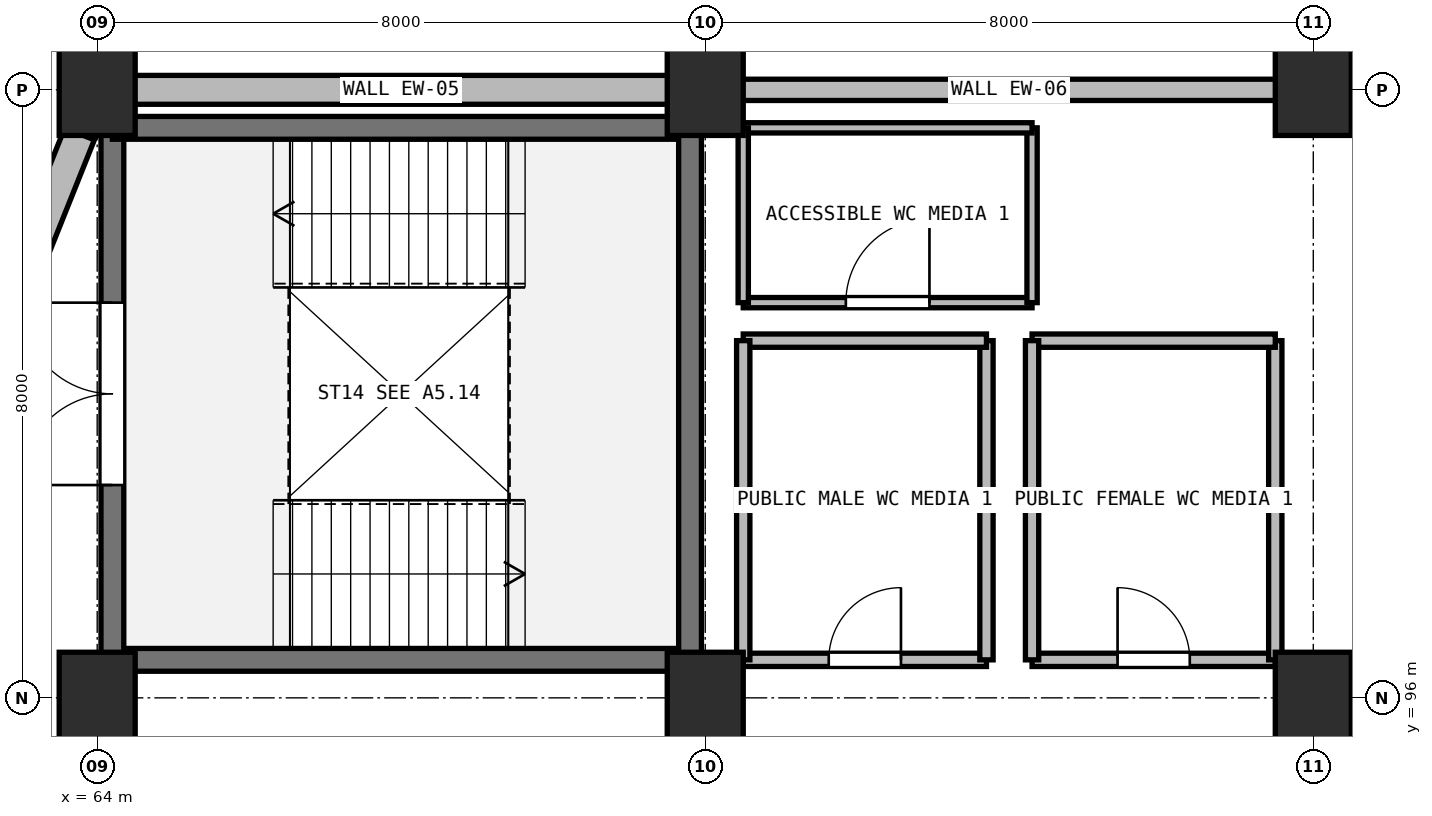
"""IFC4 building model, lengths in metres.
Left out: names, types, materials, properties, quantities, classifications, styles, units other than length and angle.
Written with IfcOpenShell. Run it as: python <this file> out.ifc"""

import sys

from ifc_helpers import new_model, si_unit, direction, frame, frame_2d, origin, origin_2d, place, context, subcontext, project, spatial, rectangle, extrude, element, fill, save


model = new_model("IFC4")
c1 = context("Model", 3, precision=1e-05, world=origin(), true_north=direction((0.0, 1.0)))
c2 = subcontext(c1, "Body", "Model", "MODEL_VIEW")
j1 = project(units=[si_unit("LENGTHUNIT", "METRE"), si_unit("PLANEANGLEUNIT", "RADIAN")], contexts=[c1])
p1 = place(None, origin())
s1 = spatial("IfcSite", under=j1, at=p1, CompositionType="ELEMENT")
p2 = place(p1, origin())
s2 = spatial("IfcBuilding", under=s1, at=p2, CompositionType="ELEMENT")
p3 = place(p2, frame((0.0, 0.0, 19.8)))
s3 = spatial("IfcBuildingStorey", under=s2, at=p3, CompositionType="ELEMENT", Elevation=19.8)
for number, where, z_axis, x_axis in (
    (1, (64.0, 96.0, 0.0), (0.0, 0.0, 1.0), (1.0, 0.0, 0.0)),
    (2, (64.0, 104.0, 0.0), (0.0, 0.0, 1.0), (1.0, 0.0, 0.0)),
    (3, (72.0, 96.0, 0.0), (0.0, 0.0, 1.0), (1.0, 0.0, 0.0)),
    (4, (72.0, 104.0, 0.0), (0.0, 0.0, 1.0), (1.0, 0.0, 0.0)),
    (5, (80.0, 96.0, 0.0), (0.0, 0.0, 1.0), (1.0, 0.0, 0.0)),
    (6, (80.0, 104.0, 0.0), (0.0, 0.0, 1.0), (1.0, 0.0, 0.0)),
):
    element("IfcColumn", number, at=place(p3, frame(where, z_axis=z_axis, x_axis=x_axis)), inside=s3, PredefinedType="COLUMN", context=c2, shape_type="SweptSolid", body=[
        extrude(rectangle(XDim=1.0, YDim=1.2, at=origin_2d()), origin(), (0.0, 0.0, 1.0), 4.8),
    ])
p4 = place(p3, frame((64.48, 104.0, 0.0), z_axis=(0.0, 0.0, 1.0), x_axis=(1.0, 0.0, 0.0)))
e7 = element("IfcWall", 7, at=p4, inside=s3, PredefinedType="SOLIDWALL", context=c2, shape_type="SweptSolid", body=[
    extrude(rectangle(XDim=7.04, YDim=0.38, at=frame_2d((3.52, 0.0))), origin(), (0.0, 0.0, 1.0), 3.6),
])
p5 = place(p3, frame((72.48, 104.0, 0.0), z_axis=(0.0, 0.0, 1.0), x_axis=(1.0, 0.0, 0.0)))
e8 = element("IfcWall", 8, at=p5, inside=s3, PredefinedType="SOLIDWALL", context=c2, shape_type="SweptSolid", body=[
    extrude(rectangle(XDim=7.04, YDim=0.28, at=frame_2d((3.52, 0.0))), origin(), (0.0, 0.0, 1.0), 3.6),
])
p6 = place(p3, frame((80.48, 104.0, 0.0), z_axis=(0.0, 0.0, 1.0), x_axis=(1.0, 0.0, 0.0)))
e9 = element("IfcWall", 9, at=p6, inside=s3, PredefinedType="SOLIDWALL", context=c2, shape_type="SweptSolid", body=[
    extrude(rectangle(XDim=7.04, YDim=0.29, at=frame_2d((3.52, 0.0))), origin(), (0.0, 0.0, 1.0), 3.6),
])
p7 = place(p3, frame((60.8, 96.0, 0.0), z_axis=(0.0, 0.0, 1.0), x_axis=(0.371395943584, 0.928474583976, 0.0)))
e10 = element("IfcWall", 10, at=p7, inside=s3, PredefinedType="SOLIDWALL", context=c2, shape_type="SweptSolid", body=[
    extrude(rectangle(XDim=7.991, YDim=0.42, at=frame_2d((3.996, 0.0))), origin(), (0.0, 0.0, 1.0), 3.45),
])
p8 = place(p3, frame((71.8, 96.5, 0.0), z_axis=(0.0, 0.0, 1.0), x_axis=(-1.0, 0.0, 0.0)))
e11 = element("IfcWall", 11, at=p8, inside=s3, PredefinedType="SHEAR", context=c2, shape_type="SweptSolid", body=[
    extrude(rectangle(XDim=7.6, YDim=0.3, at=frame_2d((3.8, 0.0))), origin(), (0.0, 0.0, 1.0), 4.5),
])
p9 = place(p3, frame((64.2, 96.5, 0.0), z_axis=(0.0, 0.0, 1.0), x_axis=(0.0, 1.0, 0.0)))
e12 = element("IfcWall", 12, at=p9, inside=s3, PredefinedType="SHEAR", context=c2, shape_type="SweptSolid", body=[
    extrude(rectangle(XDim=7.0, YDim=0.3, at=frame_2d((3.5, 0.0))), origin(), (0.0, 0.0, 1.0), 4.5),
])
p10 = place(p9, frame((2.3, 0.0, 0.0)))
e13 = element("IfcOpeningElement", 13, at=p10, cuts=e12, PredefinedType="OPENING", context=c2, shape_type="SweptSolid", body=[
    extrude(rectangle(XDim=2.4, YDim=2.2, at=frame_2d((1.2, 1.1))), frame((0.0, 0.16, 0.0), z_axis=(0.0, -1.0, 0.0), x_axis=(1.0, 0.0, 0.0)), (0.0, 0.0, 1.0), 0.32),
])
p11 = place(p3, frame((64.2, 103.5, 0.0), z_axis=(0.0, 0.0, 1.0), x_axis=(1.0, 0.0, 0.0)))
e14 = element("IfcWall", 14, at=p11, inside=s3, PredefinedType="SHEAR", context=c2, shape_type="SweptSolid", body=[
    extrude(rectangle(XDim=7.6, YDim=0.3, at=frame_2d((3.8, 0.0))), origin(), (0.0, 0.0, 1.0), 4.5),
])
p12 = place(p3, frame((71.8, 103.5, 0.0), z_axis=(0.0, 0.0, 1.0), x_axis=(0.0, -1.0, 0.0)))
e15 = element("IfcWall", 15, at=p12, inside=s3, PredefinedType="SHEAR", context=c2, shape_type="SweptSolid", body=[
    extrude(rectangle(XDim=7.0, YDim=0.3, at=frame_2d((3.5, 0.0))), origin(), (0.0, 0.0, 1.0), 4.5),
])
p13 = place(p3, frame((72.5, 96.5, 0.0), z_axis=(0.0, 0.0, 1.0), x_axis=(1.0, 0.0, 0.0)))
e16 = element("IfcWall", 16, at=p13, inside=s3, PredefinedType="PARTITIONING", context=c2, shape_type="SweptSolid", body=[
    extrude(rectangle(XDim=3.2, YDim=0.175, at=frame_2d((1.6, 0.0))), origin(), (0.0, 0.0, 1.0), 3.6),
])
p14 = place(p13, frame((1.125, 0.0, 0.0)))
e17 = element("IfcOpeningElement", 17, at=p14, cuts=e16, PredefinedType="OPENING", context=c2, shape_type="SweptSolid", body=[
    extrude(rectangle(XDim=0.95, YDim=2.15, at=frame_2d((0.475, 1.075))), frame((0.0, 0.098, 0.0), z_axis=(0.0, -1.0, 0.0), x_axis=(1.0, 0.0, 0.0)), (0.0, 0.0, 1.0), 0.195),
])
p15 = place(p3, frame((75.7, 96.5, 0.0), z_axis=(0.0, 0.0, 1.0), x_axis=(0.0, 1.0, 0.0)))
e18 = element("IfcWall", 18, at=p15, inside=s3, PredefinedType="PARTITIONING", context=c2, shape_type="SweptSolid", body=[
    extrude(rectangle(XDim=4.2, YDim=0.175, at=frame_2d((2.1, 0.0))), origin(), (0.0, 0.0, 1.0), 4.5),
])
p16 = place(p3, frame((75.7, 100.7, 0.0), z_axis=(0.0, 0.0, 1.0), x_axis=(-1.0, 0.0, 0.0)))
e19 = element("IfcWall", 19, at=p16, inside=s3, PredefinedType="PARTITIONING", context=c2, shape_type="SweptSolid", body=[
    extrude(rectangle(XDim=3.2, YDim=0.175, at=frame_2d((1.6, 0.0))), origin(), (0.0, 0.0, 1.0), 4.5),
])
p17 = place(p3, frame((72.5, 100.7, 0.0), z_axis=(0.0, 0.0, 1.0), x_axis=(0.0, -1.0, 0.0)))
e20 = element("IfcWall", 20, at=p17, inside=s3, PredefinedType="PARTITIONING", context=c2, shape_type="SweptSolid", body=[
    extrude(rectangle(XDim=4.2, YDim=0.175, at=frame_2d((2.1, 0.0))), origin(), (0.0, 0.0, 1.0), 3.6),
])
p18 = place(p3, frame((76.3, 96.5, 0.0), z_axis=(0.0, 0.0, 1.0), x_axis=(1.0, 0.0, 0.0)))
e21 = element("IfcWall", 21, at=p18, inside=s3, PredefinedType="PARTITIONING", context=c2, shape_type="SweptSolid", body=[
    extrude(rectangle(XDim=3.2, YDim=0.175, at=frame_2d((1.6, 0.0))), origin(), (0.0, 0.0, 1.0), 3.6),
])
p19 = place(p18, frame((1.125, 0.0, 0.0)))
e22 = element("IfcOpeningElement", 22, at=p19, cuts=e21, PredefinedType="OPENING", context=c2, shape_type="SweptSolid", body=[
    extrude(rectangle(XDim=0.95, YDim=2.15, at=frame_2d((0.475, 1.075))), frame((0.0, 0.098, 0.0), z_axis=(0.0, -1.0, 0.0), x_axis=(1.0, 0.0, 0.0)), (0.0, 0.0, 1.0), 0.195),
])
p20 = place(p3, frame((79.5, 96.5, 0.0), z_axis=(0.0, 0.0, 1.0), x_axis=(0.0, 1.0, 0.0)))
e23 = element("IfcWall", 23, at=p20, inside=s3, PredefinedType="PARTITIONING", context=c2, shape_type="SweptSolid", body=[
    extrude(rectangle(XDim=4.2, YDim=0.175, at=frame_2d((2.1, 0.0))), origin(), (0.0, 0.0, 1.0), 3.6),
])
p21 = place(p3, frame((79.5, 100.7, 0.0), z_axis=(0.0, 0.0, 1.0), x_axis=(-1.0, 0.0, 0.0)))
e24 = element("IfcWall", 24, at=p21, inside=s3, PredefinedType="PARTITIONING", context=c2, shape_type="SweptSolid", body=[
    extrude(rectangle(XDim=3.2, YDim=0.175, at=frame_2d((1.6, 0.0))), origin(), (0.0, 0.0, 1.0), 4.5),
])
p22 = place(p3, frame((76.3, 100.7, 0.0), z_axis=(0.0, 0.0, 1.0), x_axis=(0.0, -1.0, 0.0)))
e25 = element("IfcWall", 25, at=p22, inside=s3, PredefinedType="PARTITIONING", context=c2, shape_type="SweptSolid", body=[
    extrude(rectangle(XDim=4.2, YDim=0.175, at=frame_2d((2.1, 0.0))), origin(), (0.0, 0.0, 1.0), 4.5),
])
p23 = place(p3, frame((72.5, 101.2, 0.0), z_axis=(0.0, 0.0, 1.0), x_axis=(1.0, 0.0, 0.0)))
e26 = element("IfcWall", 26, at=p23, inside=s3, PredefinedType="PARTITIONING", context=c2, shape_type="SweptSolid", body=[
    extrude(rectangle(XDim=3.8, YDim=0.135, at=frame_2d((1.9, 0.0))), origin(), (0.0, 0.0, 1.0), 4.5),
])
p24 = place(p23, frame((1.35, 0.0, 0.0)))
e27 = element("IfcOpeningElement", 27, at=p24, cuts=e26, PredefinedType="OPENING", context=c2, shape_type="SweptSolid", body=[
    extrude(rectangle(XDim=1.1, YDim=2.15, at=frame_2d((0.55, 1.075))), frame((0.0, 0.078, 0.0), z_axis=(0.0, -1.0, 0.0), x_axis=(1.0, 0.0, 0.0)), (0.0, 0.0, 1.0), 0.155),
])
p25 = place(p3, frame((76.3, 101.2, 0.0), z_axis=(0.0, 0.0, 1.0), x_axis=(0.0, 1.0, 0.0)))
e28 = element("IfcWall", 28, at=p25, inside=s3, PredefinedType="PARTITIONING", context=c2, shape_type="SweptSolid", body=[
    extrude(rectangle(XDim=2.3, YDim=0.135, at=frame_2d((1.15, 0.0))), origin(), (0.0, 0.0, 1.0), 4.5),
])
p26 = place(p3, frame((76.3, 103.5, 0.0), z_axis=(0.0, 0.0, 1.0), x_axis=(-1.0, 0.0, 0.0)))
e29 = element("IfcWall", 29, at=p26, inside=s3, PredefinedType="PARTITIONING", context=c2, shape_type="SweptSolid", body=[
    extrude(rectangle(XDim=3.8, YDim=0.135, at=frame_2d((1.9, 0.0))), origin(), (0.0, 0.0, 1.0), 3.6),
])
p27 = place(p3, frame((72.5, 103.5, 0.0), z_axis=(0.0, 0.0, 1.0), x_axis=(0.0, -1.0, 0.0)))
e30 = element("IfcWall", 30, at=p27, inside=s3, PredefinedType="PARTITIONING", context=c2, shape_type="SweptSolid", body=[
    extrude(rectangle(XDim=2.3, YDim=0.135, at=frame_2d((1.15, 0.0))), origin(), (0.0, 0.0, 1.0), 3.6),
])
p28 = place(p10, frame((2.4, 0.0, 0.0), z_axis=(0.0, 0.0, 1.0), x_axis=(-1.0, 0.0, 0.0)))
e31 = element("IfcDoor", 31, at=p28, inside=s3, OperationType="DOUBLE_DOOR_SINGLE_SWING", PredefinedType="DOOR", context=c2, shape_type="SweptSolid", body=[
    extrude(rectangle(XDim=2.4, YDim=2.2, at=frame_2d((1.2, 1.1))), frame((0.0, 0.025, 0.0), z_axis=(0.0, -1.0, 0.0), x_axis=(1.0, 0.0, 0.0)), (0.0, 0.0, 1.0), 0.05),
])
fill(e13, e31)
p29 = place(p14, origin())
e32 = element("IfcDoor", 32, at=p29, inside=s3, OperationType="SINGLE_SWING_RIGHT", PredefinedType="DOOR", context=c2, shape_type="SweptSolid", body=[
    extrude(rectangle(XDim=0.95, YDim=2.15, at=frame_2d((0.475, 1.075))), frame((0.0, 0.025, 0.0), z_axis=(0.0, -1.0, 0.0), x_axis=(1.0, 0.0, 0.0)), (0.0, 0.0, 1.0), 0.05),
])
fill(e17, e32)
p30 = place(p19, origin())
e33 = element("IfcDoor", 33, at=p30, inside=s3, OperationType="SINGLE_SWING_LEFT", PredefinedType="DOOR", context=c2, shape_type="SweptSolid", body=[
    extrude(rectangle(XDim=0.95, YDim=2.15, at=frame_2d((0.475, 1.075))), frame((0.0, 0.025, 0.0), z_axis=(0.0, -1.0, 0.0), x_axis=(1.0, 0.0, 0.0)), (0.0, 0.0, 1.0), 0.05),
])
fill(e22, e33)
p31 = place(p24, origin())
e34 = element("IfcDoor", 34, at=p31, inside=s3, OperationType="SINGLE_SWING_RIGHT", PredefinedType="DOOR", context=c2, shape_type="SweptSolid", body=[
    extrude(rectangle(XDim=1.1, YDim=2.15, at=frame_2d((0.55, 1.075))), frame((0.0, 0.025, 0.0), z_axis=(0.0, -1.0, 0.0), x_axis=(1.0, 0.0, 0.0)), (0.0, 0.0, 1.0), 0.05),
])
fill(e27, e34)
save(model, sys.argv[1])
